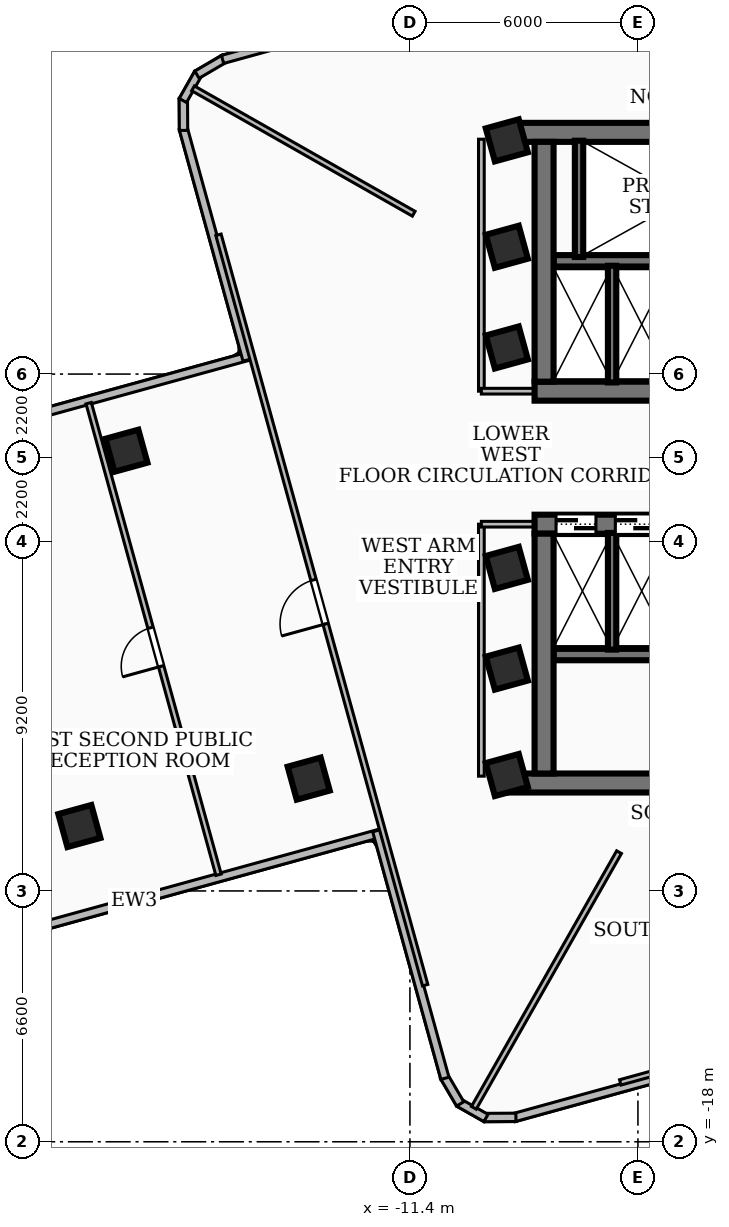
"""IFC4 building model, lengths in metres.
Left out: names, types, materials, properties, quantities, classifications, styles, units other than length and angle.
Written with IfcOpenShell. Run it as: python <this file> out.ifc"""

import sys

from ifc_helpers import new_model, si_unit, direction, frame, frame_2d, origin, origin_2d, place, context, subcontext, project, spatial, rectangle, extrude, element, fill, save


model = new_model("IFC4")
c1 = context("Model", 3, precision=1e-05, world=origin(), true_north=direction((0.0, 1.0)))
c2 = subcontext(c1, "Body", "Model", "MODEL_VIEW")
j1 = project(units=[si_unit("LENGTHUNIT", "METRE"), si_unit("PLANEANGLEUNIT", "RADIAN")], contexts=[c1])
p1 = place(None, origin())
s1 = spatial("IfcSite", under=j1, at=p1, CompositionType="ELEMENT")
p2 = place(p1, origin())
s2 = spatial("IfcBuilding", under=s1, at=p2, CompositionType="ELEMENT")
p3 = place(p2, frame((0.0, 0.0, 137.88)))
s3 = spatial("IfcBuildingStorey", under=s2, at=p3, CompositionType="ELEMENT", Elevation=137.88)
p4 = place(p3, frame((-8.78, 8.56, 0.0), z_axis=(0.0, 0.0, 1.0), x_axis=(1.0, 0.0, 0.0)))
e1 = element("IfcWall", 1, at=p4, inside=s3, PredefinedType="SHEAR", context=c2, shape_type="SweptSolid", body=[
    extrude(rectangle(XDim=17.56, YDim=0.5, at=frame_2d((8.78, 0.0))), origin(), (0.0, 0.0, 1.0), 3.32),
])
p5 = place(p3, frame((8.12, 1.75, 0.0), z_axis=(0.0, 0.0, 1.0), x_axis=(-1.0, 0.0, 0.0)))
e2 = element("IfcWall", 2, at=p5, inside=s3, PredefinedType="SHEAR", context=c2, shape_type="SweptSolid", body=[
    extrude(rectangle(XDim=16.24, YDim=0.5, at=frame_2d((8.12, 0.0))), origin(), (0.0, 0.0, 1.0), 3.32),
])
p6 = place(p5, frame((7.45, 0.0, 0.0)))
e3 = element("IfcOpeningElement", 3, at=p6, cuts=e2, PredefinedType="OPENING", context=c2, shape_type="SweptSolid", body=[
    extrude(rectangle(XDim=1.0, YDim=2.1, at=frame_2d((0.5, 1.05))), frame((0.0, 0.26, 0.0), z_axis=(0.0, -1.0, 0.0), x_axis=(1.0, 0.0, 0.0)), (0.0, 0.0, 1.0), 0.52),
])
p7 = place(p5, frame((3.4, 0.0, 0.0)))
e4 = element("IfcOpeningElement", 4, at=p7, cuts=e2, PredefinedType="OPENING", context=c2, shape_type="SweptSolid", body=[
    extrude(rectangle(XDim=0.9, YDim=2.06, at=frame_2d((0.45, 1.03))), frame((0.0, 0.26, 0.0), z_axis=(0.0, -1.0, 0.0), x_axis=(1.0, 0.0, 0.0)), (0.0, 0.0, 1.0), 0.52),
])
p8 = place(p5, frame((1.1, 0.0, 0.0)))
e5 = element("IfcOpeningElement", 5, at=p8, cuts=e2, PredefinedType="OPENING", context=c2, shape_type="SweptSolid", body=[
    extrude(rectangle(XDim=0.9, YDim=2.06, at=frame_2d((0.45, 1.03))), frame((0.0, 0.26, 0.0), z_axis=(0.0, -1.0, 0.0), x_axis=(1.0, 0.0, 0.0)), (0.0, 0.0, 1.0), 0.52),
])
p9 = place(p3, frame((-7.87, 2.0, 0.0), z_axis=(0.0, 0.0, 1.0), x_axis=(0.0, 1.0, 0.0)))
e6 = element("IfcWall", 6, at=p9, inside=s3, PredefinedType="SHEAR", context=c2, shape_type="SweptSolid", body=[
    extrude(rectangle(XDim=6.31, YDim=0.5, at=frame_2d((3.155, 0.0))), origin(), (0.0, 0.0, 1.0), 3.32),
])
p10 = place(p3, frame((7.62, 5.18, 0.0), z_axis=(0.0, 0.0, 1.0), x_axis=(-1.0, 0.0, 0.0)))
e7 = element("IfcWall", 7, at=p10, inside=s3, PredefinedType="SOLIDWALL", context=c2, shape_type="SweptSolid", body=[
    extrude(rectangle(XDim=15.24, YDim=0.3, at=frame_2d((7.62, 0.0))), origin(), (0.0, 0.0, 1.0), 3.32),
])
p11 = place(p10, frame((5.77, 0.0, 0.0)))
e8 = element("IfcOpeningElement", 8, at=p11, cuts=e7, PredefinedType="OPENING", context=c2, shape_type="SweptSolid", body=[
    extrude(rectangle(XDim=1.1, YDim=2.15, at=frame_2d((0.55, 1.075))), frame((0.0, 0.16, 0.0), z_axis=(0.0, -1.0, 0.0), x_axis=(1.0, 0.0, 0.0)), (0.0, 0.0, 1.0), 0.32),
])
p12 = place(p10, frame((2.97, 0.0, 0.0)))
e9 = element("IfcOpeningElement", 9, at=p12, cuts=e7, PredefinedType="OPENING", context=c2, shape_type="SweptSolid", body=[
    extrude(rectangle(XDim=1.1, YDim=2.15, at=frame_2d((0.55, 1.075))), frame((0.0, 0.16, 0.0), z_axis=(0.0, -1.0, 0.0), x_axis=(1.0, 0.0, 0.0)), (0.0, 0.0, 1.0), 0.32),
])
p13 = place(p10, frame((7.97, 0.0, 0.0)))
e10 = element("IfcOpeningElement", 10, at=p13, cuts=e7, PredefinedType="OPENING", context=c2, shape_type="SweptSolid", body=[
    extrude(rectangle(XDim=1.0, YDim=2.1, at=frame_2d((0.5, 1.05))), frame((0.0, 0.16, 0.0), z_axis=(0.0, -1.0, 0.0), x_axis=(1.0, 0.0, 0.0)), (0.0, 0.0, 1.0), 0.32),
])
p14 = place(p3, frame((8.78, -8.56, 0.0), z_axis=(0.0, 0.0, 1.0), x_axis=(-1.0, 0.0, 0.0)))
e11 = element("IfcWall", 11, at=p14, inside=s3, PredefinedType="SHEAR", context=c2, shape_type="SweptSolid", body=[
    extrude(rectangle(XDim=17.56, YDim=0.5, at=frame_2d((8.78, 0.0))), origin(), (0.0, 0.0, 1.0), 3.32),
])
p15 = place(p3, frame((-8.12, -1.75, 0.0), z_axis=(0.0, 0.0, 1.0), x_axis=(1.0, 0.0, 0.0)))
e12 = element("IfcWall", 12, at=p15, inside=s3, PredefinedType="SHEAR", context=c2, shape_type="SweptSolid", body=[
    extrude(rectangle(XDim=16.24, YDim=0.5, at=frame_2d((8.12, 0.0))), origin(), (0.0, 0.0, 1.0), 3.32),
])
p16 = place(p15, frame((7.45, 0.0, 0.0)))
e13 = element("IfcOpeningElement", 13, at=p16, cuts=e12, PredefinedType="OPENING", context=c2, shape_type="SweptSolid", body=[
    extrude(rectangle(XDim=1.0, YDim=2.1, at=frame_2d((0.5, 1.05))), frame((0.0, 0.26, 0.0), z_axis=(0.0, -1.0, 0.0), x_axis=(1.0, 0.0, 0.0)), (0.0, 0.0, 1.0), 0.52),
])
p17 = place(p15, frame((12.65, 0.0, 0.0)))
e14 = element("IfcOpeningElement", 14, at=p17, cuts=e12, PredefinedType="OPENING", context=c2, shape_type="SweptSolid", body=[
    extrude(rectangle(XDim=0.9, YDim=2.06, at=frame_2d((0.45, 1.03))), frame((0.0, 0.26, 0.0), z_axis=(0.0, -1.0, 0.0), x_axis=(1.0, 0.0, 0.0)), (0.0, 0.0, 1.0), 0.52),
])
p18 = place(p15, frame((0.565, 0.0, 0.0)))
e15 = element("IfcOpeningElement", 15, at=p18, cuts=e12, PredefinedType="OPENING", context=c2, shape_type="SweptSolid", body=[
    extrude(rectangle(XDim=1.05, YDim=2.15, at=frame_2d((0.525, 1.075))), frame((0.0, 0.26, 0.0), z_axis=(0.0, -1.0, 0.0), x_axis=(1.0, 0.0, 0.0)), (0.0, 0.0, 1.0), 0.52),
])
p19 = place(p15, frame((2.125, 0.0, 0.0)))
e16 = element("IfcOpeningElement", 16, at=p19, cuts=e12, PredefinedType="OPENING", context=c2, shape_type="SweptSolid", body=[
    extrude(rectangle(XDim=1.05, YDim=2.15, at=frame_2d((0.525, 1.075))), frame((0.0, 0.26, 0.0), z_axis=(0.0, -1.0, 0.0), x_axis=(1.0, 0.0, 0.0)), (0.0, 0.0, 1.0), 0.52),
])
p20 = place(p15, frame((3.685, 0.0, 0.0)))
e17 = element("IfcOpeningElement", 17, at=p20, cuts=e12, PredefinedType="OPENING", context=c2, shape_type="SweptSolid", body=[
    extrude(rectangle(XDim=1.05, YDim=2.15, at=frame_2d((0.525, 1.075))), frame((0.0, 0.26, 0.0), z_axis=(0.0, -1.0, 0.0), x_axis=(1.0, 0.0, 0.0)), (0.0, 0.0, 1.0), 0.52),
])
p21 = place(p3, frame((-7.87, -8.31, 0.0), z_axis=(0.0, 0.0, 1.0), x_axis=(0.0, 1.0, 0.0)))
e18 = element("IfcWall", 18, at=p21, inside=s3, PredefinedType="SHEAR", context=c2, shape_type="SweptSolid", body=[
    extrude(rectangle(XDim=6.31, YDim=0.5, at=frame_2d((3.155, 0.0))), origin(), (0.0, 0.0, 1.0), 3.32),
])
p22 = place(p3, frame((-7.62, -5.18, 0.0), z_axis=(0.0, 0.0, 1.0), x_axis=(1.0, 0.0, 0.0)))
e19 = element("IfcWall", 19, at=p22, inside=s3, PredefinedType="SOLIDWALL", context=c2, shape_type="SweptSolid", body=[
    extrude(rectangle(XDim=15.24, YDim=0.3, at=frame_2d((7.62, 0.0))), origin(), (0.0, 0.0, 1.0), 3.32),
])
p23 = place(p22, frame((5.77, 0.0, 0.0)))
e20 = element("IfcOpeningElement", 20, at=p23, cuts=e19, PredefinedType="OPENING", context=c2, shape_type="SweptSolid", body=[
    extrude(rectangle(XDim=1.1, YDim=2.15, at=frame_2d((0.55, 1.075))), frame((0.0, 0.16, 0.0), z_axis=(0.0, -1.0, 0.0), x_axis=(1.0, 0.0, 0.0)), (0.0, 0.0, 1.0), 0.32),
])
p24 = place(p22, frame((7.97, 0.0, 0.0)))
e21 = element("IfcOpeningElement", 21, at=p24, cuts=e19, PredefinedType="OPENING", context=c2, shape_type="SweptSolid", body=[
    extrude(rectangle(XDim=1.0, YDim=2.1, at=frame_2d((0.5, 1.05))), frame((0.0, 0.16, 0.0), z_axis=(0.0, -1.0, 0.0), x_axis=(1.0, 0.0, 0.0)), (0.0, 0.0, 1.0), 0.32),
])
p25 = place(p3, frame((-6.95, 5.28, 0.0), z_axis=(0.0, 0.0, 1.0), x_axis=(0.0, 1.0, 0.0)))
e22 = element("IfcWall", 22, at=p25, inside=s3, PredefinedType="SOLIDWALL", context=c2, shape_type="SweptSolid", body=[
    extrude(rectangle(XDim=3.06, YDim=0.22, at=frame_2d((1.53, 0.0))), origin(), (0.0, 0.0, 1.0), 3.32),
])
for number, where, z_axis, x_axis in (
    (23, (-6.08, 1.98, 0.0), (0.0, 0.0, 1.0), (0.0, 1.0, 0.0)),
    (24, (-6.08, -5.05, 0.0), (0.0, 0.0, 1.0), (0.0, 1.0, 0.0)),
):
    element("IfcWall", number, at=place(p3, frame(where, z_axis=z_axis, x_axis=x_axis)), inside=s3, PredefinedType="SOLIDWALL", context=c2, shape_type="SweptSolid", body=[
        extrude(rectangle(XDim=3.07, YDim=0.22, at=frame_2d((1.535, 0.0))), origin(), (0.0, 0.0, 1.0), 3.32),
    ])
for number, where, z_axis, x_axis in (
    (25, (-8.85, -5.55, 0.0), (0.0, 0.0, 1.0), (0.964, 0.266, 0.0)),
    (26, (-8.85, -2.9, 0.0), (0.0, 0.0, 1.0), (0.964, 0.266, 0.0)),
    (27, (-8.85, 2.9, 0.0), (0.0, 0.0, 1.0), (0.964, 0.266, 0.0)),
    (28, (-8.85, 5.55, 0.0), (0.0, 0.0, 1.0), (0.964, 0.266, 0.0)),
    (29, (-8.85, 8.35, 0.0), (0.0, 0.0, 1.0), (0.964, 0.266, 0.0)),
    (30, (-8.85, -8.35, 0.0), (0.0, 0.0, 1.0), (0.964, 0.266, 0.0)),
    (31, (-18.86, 0.183, 0.0), (0.0, 0.0, 1.0), (0.964, 0.266, 0.0)),
    (32, (-14.064, -8.445, 0.0), (0.0, 0.0, 1.0), (0.964, 0.266, 0.0)),
    (33, (-20.098, -9.692, 0.0), (0.0, 0.0, 1.0), (0.964, 0.266, 0.0)),
):
    element("IfcColumn", number, at=place(p3, frame(where, z_axis=z_axis, x_axis=x_axis)), inside=s3, PredefinedType="COLUMN", context=c2, shape_type="SweptSolid", body=[
        extrude(rectangle(XDim=0.9, YDim=0.9, at=origin_2d()), origin(), (0.0, 0.0, 1.0), 3.6),
    ])
p26 = place(p3, frame((-12.166, -9.876, 0.0), z_axis=(0.0, 0.0, 1.0), x_axis=(-0.964099811745, -0.2655401156, 0.0)))
e34 = element("IfcWall", 34, at=p26, inside=s3, PredefinedType="SOLIDWALL", context=c2, shape_type="SweptSolid", body=[
    extrude(rectangle(XDim=13.459, YDim=0.22, at=frame_2d((6.729, 0.0))), origin(), (0.0, 0.0, 1.0), 2.624),
])
p27 = place(p3, frame((-28.599, -0.897, 0.0), z_axis=(0.0, 0.0, 1.0), x_axis=(0.964113270695, 0.265491245185, 0.0)))
e35 = element("IfcWall", 35, at=p27, inside=s3, PredefinedType="SOLIDWALL", context=c2, shape_type="SweptSolid", body=[
    extrude(rectangle(XDim=13.458, YDim=0.22, at=frame_2d((6.729, 0.0))), origin(), (0.0, 0.0, 1.0), 3.32),
])
p28 = place(p27, frame((1.1, 0.0, 0.85)))
e36 = element("IfcOpeningElement", 36, at=p28, cuts=e35, PredefinedType="OPENING", context=c2, shape_type="SweptSolid", body=[
    extrude(rectangle(XDim=1.8, YDim=2.0, at=frame_2d((0.9, 1.0))), frame((0.0, 0.12, 0.0), z_axis=(0.0, -1.0, 0.0), x_axis=(1.0, 0.0, 0.0)), (0.0, 0.0, 1.0), 0.24),
])
p29 = place(p3, frame((-15.686, 2.568, 0.0), z_axis=(0.0, 0.0, 1.0), x_axis=(-0.265558779784, 0.964094670911, 0.0)))
e37 = element("IfcWall", 37, at=p29, inside=s3, PredefinedType="SOLIDWALL", context=c2, shape_type="SweptSolid", body=[
    extrude(rectangle(XDim=6.319, YDim=0.22, at=frame_2d((3.159, 0.0))), origin(), (0.0, 0.0, 1.0), 3.32),
])
p30 = place(p3, frame((-17.357, 8.611, 0.0), z_axis=(0.0, 0.0, 1.0), x_axis=(-0.006140235123, 0.999981148579, 0.0)))
e38 = element("IfcWall", 38, at=p30, inside=s3, PredefinedType="SOLIDWALL", context=c2, shape_type="SweptSolid", body=[
    extrude(rectangle(XDim=0.835, YDim=0.22, at=frame_2d((0.417, 0.0))), origin(), (0.0, 0.0, 1.0), 3.32),
])
p31 = place(p3, frame((-17.374, 9.399, 0.0), z_axis=(0.0, 0.0, 1.0), x_axis=(0.492959963164, 0.87005199541, 0.0)))
e39 = element("IfcWall", 39, at=p31, inside=s3, PredefinedType="SOLIDWALL", context=c2, shape_type="SweptSolid", body=[
    extrude(rectangle(XDim=0.82, YDim=0.22, at=frame_2d((0.41, 0.0))), origin(), (0.0, 0.0, 1.0), 3.32),
])
p32 = place(p3, frame((-17.004, 10.077, 0.0), z_axis=(0.0, 0.0, 1.0), x_axis=(0.862662761192, 0.505779557172, 0.0)))
e40 = element("IfcWall", 40, at=p32, inside=s3, PredefinedType="SOLIDWALL", context=c2, shape_type="SweptSolid", body=[
    extrude(rectangle(XDim=0.834, YDim=0.22, at=frame_2d((0.417, 0.0))), origin(), (0.0, 0.0, 1.0), 3.32),
])
p33 = place(p3, frame((-16.33, 10.479, 0.0), z_axis=(0.0, 0.0, 1.0), x_axis=(0.964092175021, 0.265567840793, 0.0)))
e41 = element("IfcWall", 41, at=p33, inside=s3, PredefinedType="SOLIDWALL", context=c2, shape_type="SweptSolid", body=[
    extrude(rectangle(XDim=6.759, YDim=0.22, at=frame_2d((3.379, 0.0))), origin(), (0.0, 0.0, 1.0), 3.32),
])
p34 = place(p3, frame((-2.568, -15.686, 0.0), z_axis=(0.0, 0.0, 1.0), x_axis=(-0.964094670911, -0.265558779784, 0.0)))
e42 = element("IfcWall", 42, at=p34, inside=s3, PredefinedType="SOLIDWALL", context=c2, shape_type="SweptSolid", body=[
    extrude(rectangle(XDim=6.319, YDim=0.22, at=frame_2d((3.159, 0.0))), origin(), (0.0, 0.0, 1.0), 2.55),
])
p35 = place(p3, frame((-8.611, -17.357, 0.0), z_axis=(0.0, 0.0, 1.0), x_axis=(-0.999981148579, -0.006140235123, 0.0)))
e43 = element("IfcWall", 43, at=p35, inside=s3, PredefinedType="SOLIDWALL", context=c2, shape_type="SweptSolid", body=[
    extrude(rectangle(XDim=0.835, YDim=0.22, at=frame_2d((0.417, 0.0))), origin(), (0.0, 0.0, 1.0), 3.32),
])
p36 = place(p3, frame((-9.399, -17.374, 0.0), z_axis=(0.0, 0.0, 1.0), x_axis=(-0.87005199541, 0.492959963164, 0.0)))
e44 = element("IfcWall", 44, at=p36, inside=s3, PredefinedType="SOLIDWALL", context=c2, shape_type="SweptSolid", body=[
    extrude(rectangle(XDim=0.82, YDim=0.22, at=frame_2d((0.41, 0.0))), origin(), (0.0, 0.0, 1.0), 3.32),
])
p37 = place(p3, frame((-10.077, -17.004, 0.0), z_axis=(0.0, 0.0, 1.0), x_axis=(-0.505779557172, 0.862662761192, 0.0)))
e45 = element("IfcWall", 45, at=p37, inside=s3, PredefinedType="SOLIDWALL", context=c2, shape_type="SweptSolid", body=[
    extrude(rectangle(XDim=0.834, YDim=0.22, at=frame_2d((0.417, 0.0))), origin(), (0.0, 0.0, 1.0), 3.32),
])
p38 = place(p3, frame((-10.479, -16.33, 0.0), z_axis=(0.0, 0.0, 1.0), x_axis=(-0.265567840793, 0.964092175021, 0.0)))
e46 = element("IfcWall", 46, at=p38, inside=s3, PredefinedType="SOLIDWALL", context=c2, shape_type="SweptSolid", body=[
    extrude(rectangle(XDim=6.759, YDim=0.22, at=frame_2d((3.379, 0.0))), origin(), (0.0, 0.0, 1.0), 2.624),
])
p39 = place(p3, frame((-9.52, 1.75, 0.0), z_axis=(0.0, 0.0, 1.0), x_axis=(0.0, 1.0, 0.0)))
e47 = element("IfcWall", 47, at=p39, inside=s3, PredefinedType="PARTITIONING", context=c2, shape_type="SweptSolid", body=[
    extrude(rectangle(XDim=6.63, YDim=0.15, at=frame_2d((3.315, 0.0))), origin(), (0.0, 0.0, 1.0), 2.55),
])
p40 = place(p3, frame((-7.85, 1.75, 0.0), z_axis=(0.0, 0.0, 1.0), x_axis=(-1.0, 0.0, 0.0)))
e48 = element("IfcWall", 48, at=p40, inside=s3, PredefinedType="PARTITIONING", context=c2, shape_type="SweptSolid", body=[
    extrude(rectangle(XDim=1.67, YDim=0.15, at=frame_2d((0.835, 0.0))), origin(), (0.0, 0.0, 1.0), 2.55),
])
p41 = place(p3, frame((-9.52, -8.38, 0.0), z_axis=(0.0, 0.0, 1.0), x_axis=(0.0, 1.0, 0.0)))
e49 = element("IfcWall", 49, at=p41, inside=s3, PredefinedType="PARTITIONING", context=c2, shape_type="SweptSolid", body=[
    extrude(rectangle(XDim=6.63, YDim=0.15, at=frame_2d((3.315, 0.0))), origin(), (0.0, 0.0, 1.0), 2.55),
])
p42 = place(p3, frame((-7.85, -1.75, 0.0), z_axis=(0.0, 0.0, 1.0), x_axis=(-1.0, 0.0, 0.0)))
e50 = element("IfcWall", 50, at=p42, inside=s3, PredefinedType="PARTITIONING", context=c2, shape_type="SweptSolid", body=[
    extrude(rectangle(XDim=1.67, YDim=0.15, at=frame_2d((0.835, 0.0))), origin(), (0.0, 0.0, 1.0), 2.55),
])
p43 = place(p3, frame((-11.3, 6.419, 0.0), z_axis=(0.0, 0.0, 1.0), x_axis=(-0.869475469758, 0.493976120363, 0.0)))
e51 = element("IfcWall", 51, at=p43, inside=s3, PredefinedType="PARTITIONING", context=c2, shape_type="SweptSolid", body=[
    extrude(rectangle(XDim=6.679, YDim=0.145, at=frame_2d((3.339, 0.0))), origin(), (0.0, 0.0, 1.0), 3.32),
])
p44 = place(p3, frame((-5.897, -10.38, 0.0), z_axis=(0.0, 0.0, 1.0), x_axis=(-0.49389771586, -0.869520009125, 0.0)))
e52 = element("IfcWall", 52, at=p44, inside=s3, PredefinedType="PARTITIONING", context=c2, shape_type="SweptSolid", body=[
    extrude(rectangle(XDim=7.737, YDim=0.145, at=frame_2d((3.868, 0.0))), origin(), (0.0, 0.0, 1.0), 2.55),
])
p45 = place(p3, frame((-10.999, -13.879, 0.0), z_axis=(0.0, 0.0, 1.0), x_axis=(-0.26558288107, 0.964088031915, 0.0)))
e53 = element("IfcWall", 53, at=p45, inside=s3, PredefinedType="PARTITIONING", context=c2, shape_type="SweptSolid", body=[
    extrude(rectangle(XDim=20.479, YDim=0.145, at=frame_2d((10.24, 0.0))), origin(), (0.0, 0.0, 1.0), 2.55),
])
p46 = place(p45, frame((9.86, 0.0, 0.0)))
e54 = element("IfcOpeningElement", 54, at=p46, cuts=e53, PredefinedType="OPENING", context=c2, shape_type="SweptSolid", body=[
    extrude(rectangle(XDim=1.2, YDim=2.1, at=frame_2d((0.6, 1.05))), frame((0.0, 0.083, 0.0), z_axis=(0.0, -1.0, 0.0), x_axis=(1.0, 0.0, 0.0)), (0.0, 0.0, 1.0), 0.165),
])
p47 = place(p3, frame((-16.436, -10.974, 0.0), z_axis=(0.0, 0.0, 1.0), x_axis=(-0.265498602623, 0.964111244621, 0.0)))
e55 = element("IfcWall", 55, at=p47, inside=s3, PredefinedType="PARTITIONING", context=c2, shape_type="SweptSolid", body=[
    extrude(rectangle(XDim=12.87, YDim=0.145, at=frame_2d((6.435, 0.0))), origin(), (0.0, 0.0, 1.0), 2.55),
])
p48 = place(p47, frame((5.69, 0.0, 0.0)))
e56 = element("IfcOpeningElement", 56, at=p48, cuts=e55, PredefinedType="OPENING", context=c2, shape_type="SweptSolid", body=[
    extrude(rectangle(XDim=1.05, YDim=2.08, at=frame_2d((0.525, 1.04))), frame((0.0, 0.083, 0.0), z_axis=(0.0, -1.0, 0.0), x_axis=(1.0, 0.0, 0.0)), (0.0, 0.0, 1.0), 0.165),
])
p49 = place(p3, frame((13.879, -10.999, 0.0), z_axis=(0.0, 0.0, 1.0), x_axis=(-0.964088031915, -0.26558288107, 0.0)))
e57 = element("IfcWall", 57, at=p49, inside=s3, PredefinedType="PARTITIONING", context=c2, shape_type="SweptSolid", body=[
    extrude(rectangle(XDim=20.479, YDim=0.145, at=frame_2d((10.24, 0.0))), origin(), (0.0, 0.0, 1.0), 2.55),
])
p50 = place(p49, frame((9.86, 0.0, 0.0)))
e58 = element("IfcOpeningElement", 58, at=p50, cuts=e57, PredefinedType="OPENING", context=c2, shape_type="SweptSolid", body=[
    extrude(rectangle(XDim=1.2, YDim=2.1, at=frame_2d((0.6, 1.05))), frame((0.0, 0.083, 0.0), z_axis=(0.0, -1.0, 0.0), x_axis=(1.0, 0.0, 0.0)), (0.0, 0.0, 1.0), 0.165),
])
p51 = place(p18, origin())
e59 = element("IfcDoor", 59, at=p51, inside=s3, OperationType="DOUBLE_DOOR_SLIDING", PredefinedType="DOOR", context=c2, shape_type="SweptSolid", body=[
    extrude(rectangle(XDim=1.05, YDim=2.15, at=frame_2d((0.525, 1.075))), frame((0.0, 0.025, 0.0), z_axis=(0.0, -1.0, 0.0), x_axis=(1.0, 0.0, 0.0)), (0.0, 0.0, 1.0), 0.05),
])
fill(e15, e59)
p52 = place(p19, origin())
e60 = element("IfcDoor", 60, at=p52, inside=s3, OperationType="DOUBLE_DOOR_SLIDING", PredefinedType="DOOR", context=c2, shape_type="SweptSolid", body=[
    extrude(rectangle(XDim=1.05, YDim=2.15, at=frame_2d((0.525, 1.075))), frame((0.0, 0.025, 0.0), z_axis=(0.0, -1.0, 0.0), x_axis=(1.0, 0.0, 0.0)), (0.0, 0.0, 1.0), 0.05),
])
fill(e16, e60)
p53 = place(p46, origin())
e61 = element("IfcDoor", 61, at=p53, inside=s3, OperationType="SINGLE_SWING_LEFT", PredefinedType="DOOR", context=c2, shape_type="SweptSolid", body=[
    extrude(rectangle(XDim=1.2, YDim=2.1, at=frame_2d((0.6, 1.05))), frame((0.0, 0.025, 0.0), z_axis=(0.0, -1.0, 0.0), x_axis=(1.0, 0.0, 0.0)), (0.0, 0.0, 1.0), 0.05),
])
fill(e54, e61)
p54 = place(p48, origin())
e62 = element("IfcDoor", 62, at=p54, inside=s3, OperationType="SINGLE_SWING_LEFT", PredefinedType="DOOR", context=c2, shape_type="SweptSolid", body=[
    extrude(rectangle(XDim=1.05, YDim=2.08, at=frame_2d((0.525, 1.04))), frame((0.0, 0.025, 0.0), z_axis=(0.0, -1.0, 0.0), x_axis=(1.0, 0.0, 0.0)), (0.0, 0.0, 1.0), 0.05),
])
fill(e56, e62)
save(model, sys.argv[1])
